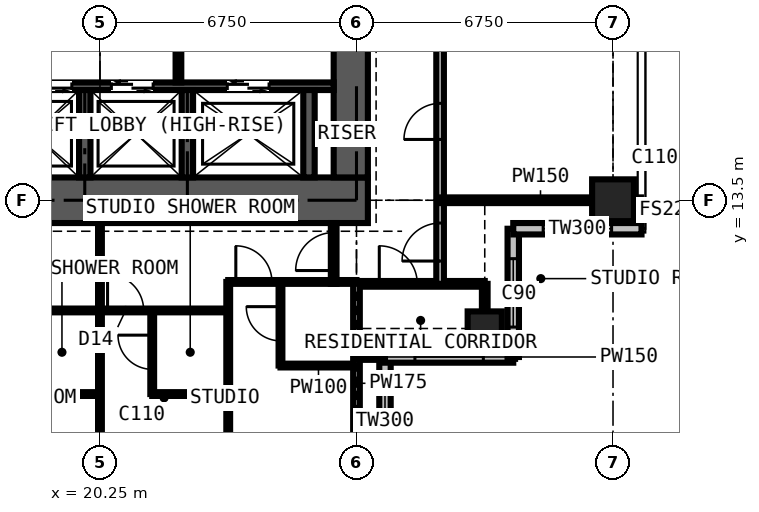
"""IFC4 building model, lengths in metres.
Left out: names, types, materials, properties, quantities, classifications, styles, units other than length and angle.
Written with IfcOpenShell. Run it as: python <this file> out.ifc"""

import sys

from ifc_helpers import new_model, si_unit, direction, frame, frame_2d, origin, origin_2d, place, context, subcontext, project, spatial, rectangle, extrude, element, fill, save


model = new_model("IFC4")
c1 = context("Model", 3, precision=1e-05, world=origin(), true_north=direction((0.0, 1.0)))
c2 = subcontext(c1, "Body", "Model", "MODEL_VIEW")
j1 = project(units=[si_unit("LENGTHUNIT", "METRE"), si_unit("PLANEANGLEUNIT", "RADIAN")], contexts=[c1])
p1 = place(None, origin())
s1 = spatial("IfcSite", under=j1, at=p1, CompositionType="ELEMENT")
p2 = place(p1, origin())
s2 = spatial("IfcBuilding", under=s1, at=p2, CompositionType="ELEMENT")
p3 = place(p2, frame((0.0, 0.0, 215.1)))
s3 = spatial("IfcBuildingStorey", under=s2, at=p3, CompositionType="ELEMENT", Elevation=215.1)
p4 = place(p3, frame((30.375, 10.125, 0.0), z_axis=(0.0, 0.0, 1.0), x_axis=(1.0, 0.0, 0.0)))
e1 = element("IfcColumn", 1, at=p4, inside=s3, PredefinedType="COLUMN", context=c2, shape_type="SweptSolid", body=[
    extrude(rectangle(XDim=0.9, YDim=0.9, at=origin_2d()), origin(), (0.0, 0.0, 1.0), 3.6),
])
p5 = place(p3, frame((33.75, 13.5, 0.0), z_axis=(0.0, 0.0, 1.0), x_axis=(1.0, 0.0, 0.0)))
e2 = element("IfcColumn", 2, at=p5, inside=s3, PredefinedType="COLUMN", context=c2, shape_type="SweptSolid", body=[
    extrude(rectangle(XDim=1.1, YDim=1.1, at=origin_2d()), origin(), (0.0, 0.0, 1.0), 3.6),
])
p6 = place(p3, frame((13.2, 13.5, 0.0), z_axis=(0.0, 0.0, 1.0), x_axis=(1.0, 0.0, 0.0)))
e3 = element("IfcWall", 3, at=p6, inside=s3, PredefinedType="SHEAR", context=c2, shape_type="SweptSolid", body=[
    extrude(rectangle(XDim=14.1, YDim=1.2, at=frame_2d((7.05, 0.0))), origin(), (0.0, 0.0, 1.0), 3.6),
])
p7 = place(p3, frame((26.85, 14.1, 0.0), z_axis=(0.0, 0.0, 1.0), x_axis=(0.0, 1.0, 0.0)))
e4 = element("IfcWall", 4, at=p7, inside=s3, PredefinedType="SHEAR", context=c2, shape_type="SweptSolid", body=[
    extrude(rectangle(XDim=12.3, YDim=0.9, at=frame_2d((6.15, 0.0))), origin(), (0.0, 0.0, 1.0), 3.6),
])
p8 = place(p7, frame((3.65, 0.0, 0.0)))
e5 = element("IfcOpeningElement", 5, at=p8, cuts=e4, PredefinedType="OPENING", context=c2, shape_type="SweptSolid", body=[
    extrude(rectangle(XDim=1.2, YDim=2.2, at=frame_2d((0.6, 1.1))), frame((0.0, 0.46, 0.0), z_axis=(0.0, -1.0, 0.0), x_axis=(1.0, 0.0, 0.0)), (0.0, 0.0, 1.0), 0.92),
])
p9 = place(p3, frame((27.75, 6.0, 0.0), z_axis=(0.0, 0.0, 1.0), x_axis=(0.0, 1.0, 0.0)))
e6 = element("IfcWall", 6, at=p9, inside=s3, PredefinedType="SOLIDWALL", context=c2, shape_type="SweptSolid", body=[
    extrude(rectangle(XDim=3.375, YDim=0.3, at=frame_2d((1.688, 0.0))), origin(), (0.0, 0.0, 1.0), 3.375),
])
p10 = place(p9, frame((0.788, 0.0, 0.6)))
e7 = element("IfcOpeningElement", 7, at=p10, cuts=e6, PredefinedType="OPENING", context=c2, shape_type="SweptSolid", body=[
    extrude(rectangle(XDim=1.8, YDim=2.1, at=frame_2d((0.9, 1.05))), frame((0.0, 0.16, 0.0), z_axis=(0.0, -1.0, 0.0), x_axis=(1.0, 0.0, 0.0)), (0.0, 0.0, 1.0), 0.32),
])
p11 = place(p3, frame((27.75, 9.375, 0.0), z_axis=(0.0, 0.0, 1.0), x_axis=(1.0, 0.0, 0.0)))
e8 = element("IfcWall", 8, at=p11, inside=s3, PredefinedType="SOLIDWALL", context=c2, shape_type="SweptSolid", body=[
    extrude(rectangle(XDim=3.375, YDim=0.3, at=frame_2d((1.688, 0.0))), origin(), (0.0, 0.0, 1.0), 3.375),
])
p12 = place(p11, frame((0.788, 0.0, 0.6)))
e9 = element("IfcOpeningElement", 9, at=p12, cuts=e8, PredefinedType="OPENING", context=c2, shape_type="SweptSolid", body=[
    extrude(rectangle(XDim=1.8, YDim=2.1, at=frame_2d((0.9, 1.05))), frame((0.0, 0.16, 0.0), z_axis=(0.0, -1.0, 0.0), x_axis=(1.0, 0.0, 0.0)), (0.0, 0.0, 1.0), 0.32),
])
p13 = place(p3, frame((31.125, 9.375, 0.0), z_axis=(0.0, 0.0, 1.0), x_axis=(0.0, 1.0, 0.0)))
e10 = element("IfcWall", 10, at=p13, inside=s3, PredefinedType="SOLIDWALL", context=c2, shape_type="SweptSolid", body=[
    extrude(rectangle(XDim=3.375, YDim=0.3, at=frame_2d((1.688, 0.0))), origin(), (0.0, 0.0, 1.0), 3.375),
])
p14 = place(p13, frame((0.788, 0.0, 0.6)))
e11 = element("IfcOpeningElement", 11, at=p14, cuts=e10, PredefinedType="OPENING", context=c2, shape_type="SweptSolid", body=[
    extrude(rectangle(XDim=1.8, YDim=2.1, at=frame_2d((0.9, 1.05))), frame((0.0, 0.16, 0.0), z_axis=(0.0, -1.0, 0.0), x_axis=(1.0, 0.0, 0.0)), (0.0, 0.0, 1.0), 0.32),
])
p15 = place(p3, frame((31.125, 12.75, 0.0), z_axis=(0.0, 0.0, 1.0), x_axis=(1.0, 0.0, 0.0)))
e12 = element("IfcWall", 12, at=p15, inside=s3, PredefinedType="SOLIDWALL", context=c2, shape_type="SweptSolid", body=[
    extrude(rectangle(XDim=3.375, YDim=0.3, at=frame_2d((1.688, 0.0))), origin(), (0.0, 0.0, 1.0), 3.375),
])
p16 = place(p15, frame((0.788, 0.0, 0.6)))
e13 = element("IfcOpeningElement", 13, at=p16, cuts=e12, PredefinedType="OPENING", context=c2, shape_type="SweptSolid", body=[
    extrude(rectangle(XDim=1.8, YDim=2.1, at=frame_2d((0.9, 1.05))), frame((0.0, 0.16, 0.0), z_axis=(0.0, -1.0, 0.0), x_axis=(1.0, 0.0, 0.0)), (0.0, 0.0, 1.0), 0.32),
])
p17 = place(p3, frame((14.1, 16.5, 0.0), z_axis=(0.0, 0.0, 1.0), x_axis=(1.0, 0.0, 0.0)))
e14 = element("IfcWall", 14, at=p17, inside=s3, PredefinedType="SHEAR", context=c2, shape_type="SweptSolid", body=[
    extrude(rectangle(XDim=12.3, YDim=0.2, at=frame_2d((6.15, 0.0))), origin(), (0.0, 0.0, 1.0), 3.6),
])
p18 = place(p17, frame((0.9, 0.0, 0.0)))
e15 = element("IfcOpeningElement", 15, at=p18, cuts=e14, PredefinedType="OPENING", context=c2, shape_type="SweptSolid", body=[
    extrude(rectangle(XDim=1.1, YDim=2.2, at=frame_2d((0.55, 1.1))), frame((0.0, 0.11, 0.0), z_axis=(0.0, -1.0, 0.0), x_axis=(1.0, 0.0, 0.0)), (0.0, 0.0, 1.0), 0.22),
])
p19 = place(p17, frame((4.31, 0.0, 0.0)))
e16 = element("IfcOpeningElement", 16, at=p19, cuts=e14, PredefinedType="OPENING", context=c2, shape_type="SweptSolid", body=[
    extrude(rectangle(XDim=1.1, YDim=2.2, at=frame_2d((0.55, 1.1))), frame((0.0, 0.11, 0.0), z_axis=(0.0, -1.0, 0.0), x_axis=(1.0, 0.0, 0.0)), (0.0, 0.0, 1.0), 0.22),
])
p20 = place(p17, frame((6.45, 0.0, 0.0)))
e17 = element("IfcOpeningElement", 17, at=p20, cuts=e14, PredefinedType="OPENING", context=c2, shape_type="SweptSolid", body=[
    extrude(rectangle(XDim=1.1, YDim=2.2, at=frame_2d((0.55, 1.1))), frame((0.0, 0.11, 0.0), z_axis=(0.0, -1.0, 0.0), x_axis=(1.0, 0.0, 0.0)), (0.0, 0.0, 1.0), 0.22),
])
p21 = place(p17, frame((9.5, 0.0, 0.0)))
e18 = element("IfcOpeningElement", 18, at=p21, cuts=e14, PredefinedType="OPENING", context=c2, shape_type="SweptSolid", body=[
    extrude(rectangle(XDim=1.1, YDim=2.2, at=frame_2d((0.55, 1.1))), frame((0.0, 0.11, 0.0), z_axis=(0.0, -1.0, 0.0), x_axis=(1.0, 0.0, 0.0)), (0.0, 0.0, 1.0), 0.22),
])
for number, where, z_axis, x_axis in (
    (19, (19.85, 14.1, 0.0), (0.0, 0.0, 1.0), (0.0, 1.0, 0.0)),
    (20, (22.55, 14.1, 0.0), (0.0, 0.0, 1.0), (0.0, 1.0, 0.0)),
    (21, (25.75, 14.1, 0.0), (0.0, 0.0, 1.0), (0.0, 1.0, 0.0)),
):
    element("IfcWall", number, at=place(p3, frame(where, z_axis=z_axis, x_axis=x_axis)), inside=s3, PredefinedType="SHEAR", context=c2, shape_type="SweptSolid", body=[
        extrude(rectangle(XDim=2.3, YDim=0.3, at=frame_2d((1.15, 0.0))), origin(), (0.0, 0.0, 1.0), 3.6),
    ])
p22 = place(p3, frame((22.315, 16.6, 0.0), z_axis=(0.0, 0.0, 1.0), x_axis=(0.0, 1.0, 0.0)))
e22 = element("IfcWall", 22, at=p22, inside=s3, PredefinedType="PARTITIONING", context=c2, shape_type="SweptSolid", body=[
    extrude(rectangle(XDim=3.5, YDim=0.15, at=frame_2d((1.75, 0.0))), origin(), (0.0, 0.0, 1.0), 3.375),
])
p23 = place(p22, frame((1.15, 0.0, 0.0)))
e23 = element("IfcOpeningElement", 23, at=p23, cuts=e22, PredefinedType="OPENING", context=c2, shape_type="SweptSolid", body=[
    extrude(rectangle(XDim=1.2, YDim=2.2, at=frame_2d((0.6, 1.1))), frame((0.0, 0.085, 0.0), z_axis=(0.0, -1.0, 0.0), x_axis=(1.0, 0.0, 0.0)), (0.0, 0.0, 1.0), 0.17),
])
p24 = place(p3, frame((13.5, 10.6, 0.0), z_axis=(0.0, 0.0, 1.0), x_axis=(1.0, 0.0, 0.0)))
e24 = element("IfcWall", 24, at=p24, inside=s3, PredefinedType="PARTITIONING", context=c2, shape_type="SweptSolid", body=[
    extrude(rectangle(XDim=10.125, YDim=0.1, at=frame_2d((5.062, 0.0))), origin(), (0.0, 0.0, 1.0), 3.375),
])
p25 = place(p24, frame((1.2, 0.0, 0.0)))
e25 = element("IfcOpeningElement", 25, at=p25, cuts=e24, PredefinedType="OPENING", context=c2, shape_type="SweptSolid", body=[
    extrude(rectangle(XDim=1.0, YDim=2.2, at=frame_2d((0.5, 1.1))), frame((0.0, 0.06, 0.0), z_axis=(0.0, -1.0, 0.0), x_axis=(1.0, 0.0, 0.0)), (0.0, 0.0, 1.0), 0.12),
])
p26 = place(p24, frame((3.575, 0.0, 0.0)))
e26 = element("IfcOpeningElement", 26, at=p26, cuts=e24, PredefinedType="OPENING", context=c2, shape_type="SweptSolid", body=[
    extrude(rectangle(XDim=0.95, YDim=2.2, at=frame_2d((0.475, 1.1))), frame((0.0, 0.06, 0.0), z_axis=(0.0, -1.0, 0.0), x_axis=(1.0, 0.0, 0.0)), (0.0, 0.0, 1.0), 0.12),
])
p27 = place(p24, frame((6.95, 0.0, 0.0)))
e27 = element("IfcOpeningElement", 27, at=p27, cuts=e24, PredefinedType="OPENING", context=c2, shape_type="SweptSolid", body=[
    extrude(rectangle(XDim=0.95, YDim=2.2, at=frame_2d((0.475, 1.1))), frame((0.0, 0.06, 0.0), z_axis=(0.0, -1.0, 0.0), x_axis=(1.0, 0.0, 0.0)), (0.0, 0.0, 1.0), 0.12),
])
p28 = place(p3, frame((18.25, 8.4, 0.0), z_axis=(0.0, 0.0, 1.0), x_axis=(1.0, 0.0, 0.0)))
e28 = element("IfcWall", 28, at=p28, inside=s3, PredefinedType="PARTITIONING", context=c2, shape_type="SweptSolid", body=[
    extrude(rectangle(XDim=2.0, YDim=0.1, at=frame_2d((1.0, 0.0))), origin(), (0.0, 0.0, 1.0), 3.375),
])
p29 = place(p3, frame((20.25, 6.016, 0.0), z_axis=(0.0, 0.0, 1.0), x_axis=(0.0, 1.0, 0.0)))
e29 = element("IfcWall", 29, at=p29, inside=s3, PredefinedType="PARTITIONING", context=c2, shape_type="SweptSolid", body=[
    extrude(rectangle(XDim=6.884, YDim=0.1, at=frame_2d((3.442, 0.0))), origin(), (0.0, 0.0, 1.0), 2.61),
])
p30 = place(p3, frame((21.625, 8.4, 0.0), z_axis=(0.0, 0.0, 1.0), x_axis=(0.0, 1.0, 0.0)))
e30 = element("IfcWall", 30, at=p30, inside=s3, PredefinedType="PARTITIONING", context=c2, shape_type="SweptSolid", body=[
    extrude(rectangle(XDim=2.2, YDim=0.1, at=frame_2d((1.1, 0.0))), origin(), (0.0, 0.0, 1.0), 3.375),
])
p31 = place(p30, frame((0.65, 0.0, 0.0)))
e31 = element("IfcOpeningElement", 31, at=p31, cuts=e30, PredefinedType="OPENING", context=c2, shape_type="SweptSolid", body=[
    extrude(rectangle(XDim=0.9, YDim=2.2, at=frame_2d((0.45, 1.1))), frame((0.0, 0.06, 0.0), z_axis=(0.0, -1.0, 0.0), x_axis=(1.0, 0.0, 0.0)), (0.0, 0.0, 1.0), 0.12),
])
p32 = place(p3, frame((21.625, 8.4, 0.0), z_axis=(0.0, 0.0, 1.0), x_axis=(1.0, 0.0, 0.0)))
e32 = element("IfcWall", 32, at=p32, inside=s3, PredefinedType="PARTITIONING", context=c2, shape_type="SweptSolid", body=[
    extrude(rectangle(XDim=2.0, YDim=0.1, at=frame_2d((1.0, 0.0))), origin(), (0.0, 0.0, 1.0), 3.375),
])
p33 = place(p3, frame((23.625, 6.016, 0.0), z_axis=(0.0, 0.0, 1.0), x_axis=(0.0, 1.0, 0.0)))
e33 = element("IfcWall", 33, at=p33, inside=s3, PredefinedType="PARTITIONING", context=c2, shape_type="SweptSolid", body=[
    extrude(rectangle(XDim=5.334, YDim=0.1, at=frame_2d((2.667, 0.0))), origin(), (0.0, 0.0, 1.0), 3.375),
])
p34 = place(p3, frame((23.625, 11.35, 0.0), z_axis=(0.0, 0.0, 1.0), x_axis=(1.0, 0.0, 0.0)))
e34 = element("IfcWall", 34, at=p34, inside=s3, PredefinedType="PARTITIONING", context=c2, shape_type="SweptSolid", body=[
    extrude(rectangle(XDim=3.375, YDim=0.1, at=frame_2d((1.688, 0.0))), origin(), (0.0, 0.0, 1.0), 3.375),
])
p35 = place(p34, frame((0.2, 0.0, 0.0)))
e35 = element("IfcOpeningElement", 35, at=p35, cuts=e34, PredefinedType="OPENING", context=c2, shape_type="SweptSolid", body=[
    extrude(rectangle(XDim=0.95, YDim=2.2, at=frame_2d((0.475, 1.1))), frame((0.0, 0.06, 0.0), z_axis=(0.0, -1.0, 0.0), x_axis=(1.0, 0.0, 0.0)), (0.0, 0.0, 1.0), 0.12),
])
p36 = place(p3, frame((25.0, 9.15, 0.0), z_axis=(0.0, 0.0, 1.0), x_axis=(0.0, 1.0, 0.0)))
e36 = element("IfcWall", 36, at=p36, inside=s3, PredefinedType="PARTITIONING", context=c2, shape_type="SweptSolid", body=[
    extrude(rectangle(XDim=2.2, YDim=0.1, at=frame_2d((1.1, 0.0))), origin(), (0.0, 0.0, 1.0), 3.375),
])
p37 = place(p36, frame((0.65, 0.0, 0.0)))
e37 = element("IfcOpeningElement", 37, at=p37, cuts=e36, PredefinedType="OPENING", context=c2, shape_type="SweptSolid", body=[
    extrude(rectangle(XDim=0.9, YDim=2.2, at=frame_2d((0.45, 1.1))), frame((0.0, 0.06, 0.0), z_axis=(0.0, -1.0, 0.0), x_axis=(1.0, 0.0, 0.0)), (0.0, 0.0, 1.0), 0.12),
])
p38 = place(p3, frame((25.0, 9.15, 0.0), z_axis=(0.0, 0.0, 1.0), x_axis=(1.0, 0.0, 0.0)))
e38 = element("IfcWall", 38, at=p38, inside=s3, PredefinedType="PARTITIONING", context=c2, shape_type="SweptSolid", body=[
    extrude(rectangle(XDim=2.0, YDim=0.1, at=frame_2d((1.0, 0.0))), origin(), (0.0, 0.0, 1.0), 3.375),
])
p39 = place(p3, frame((26.4, 11.3, 0.0), z_axis=(0.0, 0.0, 1.0), x_axis=(0.0, 1.0, 0.0)))
e39 = element("IfcWall", 39, at=p39, inside=s3, PredefinedType="PARTITIONING", context=c2, shape_type="SweptSolid", body=[
    extrude(rectangle(XDim=1.6, YDim=0.15, at=frame_2d((0.8, 0.0))), origin(), (0.0, 0.0, 1.0), 3.375),
])
p40 = place(p39, frame((0.35, 0.0, 0.0)))
e40 = element("IfcOpeningElement", 40, at=p40, cuts=e39, PredefinedType="OPENING", context=c2, shape_type="SweptSolid", body=[
    extrude(rectangle(XDim=1.0, YDim=2.2, at=frame_2d((0.5, 1.1))), frame((0.0, 0.085, 0.0), z_axis=(0.0, -1.0, 0.0), x_axis=(1.0, 0.0, 0.0)), (0.0, 0.0, 1.0), 0.17),
])
p41 = place(p3, frame((27.0, 11.3, 0.0), z_axis=(0.0, 0.0, 1.0), x_axis=(1.0, 0.0, 0.0)))
e41 = element("IfcWall", 41, at=p41, inside=s3, PredefinedType="PARTITIONING", context=c2, shape_type="SweptSolid", body=[
    extrude(rectangle(XDim=3.375, YDim=0.15, at=frame_2d((1.688, 0.0))), origin(), (0.0, 0.0, 1.0), 3.375),
])
p42 = place(p41, frame((0.6, 0.0, 0.0)))
e42 = element("IfcOpeningElement", 42, at=p42, cuts=e41, PredefinedType="OPENING", context=c2, shape_type="SweptSolid", body=[
    extrude(rectangle(XDim=1.0, YDim=2.2, at=frame_2d((0.5, 1.1))), frame((0.0, 0.085, 0.0), z_axis=(0.0, -1.0, 0.0), x_axis=(1.0, 0.0, 0.0)), (0.0, 0.0, 1.0), 0.17),
])
p43 = place(p3, frame((27.0, 6.016, 0.0), z_axis=(0.0, 0.0, 1.0), x_axis=(0.0, 1.0, 0.0)))
e43 = element("IfcWall", 43, at=p43, inside=s3, PredefinedType="PARTITIONING", context=c2, shape_type="SweptSolid", body=[
    extrude(rectangle(XDim=5.334, YDim=0.175, at=frame_2d((2.667, 0.0))), origin(), (0.0, 0.0, 1.0), 2.877),
])
p44 = place(p3, frame((27.0, 9.375, 0.0), z_axis=(0.0, 0.0, 1.0), x_axis=(1.0, 0.0, 0.0)))
e44 = element("IfcWall", 44, at=p44, inside=s3, PredefinedType="PARTITIONING", context=c2, shape_type="SweptSolid", body=[
    extrude(rectangle(XDim=0.734, YDim=0.15, at=frame_2d((0.367, 0.0))), origin(), (0.0, 0.0, 1.0), 3.375),
])
p45 = place(p3, frame((29.2, 11.3, 0.0), z_axis=(0.0, 0.0, 1.0), x_axis=(0.0, 1.0, 0.0)))
e45 = element("IfcWall", 45, at=p45, inside=s3, PredefinedType="PARTITIONING", context=c2, shape_type="SweptSolid", body=[
    extrude(rectangle(XDim=17.9, YDim=0.2, at=frame_2d((8.95, 0.0))), origin(), (0.0, 0.0, 1.0), 3.375),
])
p46 = place(p45, frame((0.6, 0.0, 0.0)))
e46 = element("IfcOpeningElement", 46, at=p46, cuts=e45, PredefinedType="OPENING", context=c2, shape_type="SweptSolid", body=[
    extrude(rectangle(XDim=1.0, YDim=2.2, at=frame_2d((0.5, 1.1))), frame((0.0, 0.11, 0.0), z_axis=(0.0, -1.0, 0.0), x_axis=(1.0, 0.0, 0.0)), (0.0, 0.0, 1.0), 0.22),
])
p47 = place(p45, frame((10.55, 0.0, 0.0)))
e47 = element("IfcOpeningElement", 47, at=p47, cuts=e45, PredefinedType="OPENING", context=c2, shape_type="SweptSolid", body=[
    extrude(rectangle(XDim=0.95, YDim=2.2, at=frame_2d((0.475, 1.1))), frame((0.0, 0.11, 0.0), z_axis=(0.0, -1.0, 0.0), x_axis=(1.0, 0.0, 0.0)), (0.0, 0.0, 1.0), 0.22),
])
p48 = place(p45, frame((3.8, 0.0, 0.0)))
e48 = element("IfcOpeningElement", 48, at=p48, cuts=e45, PredefinedType="OPENING", context=c2, shape_type="SweptSolid", body=[
    extrude(rectangle(XDim=0.95, YDim=2.2, at=frame_2d((0.475, 1.1))), frame((0.0, 0.11, 0.0), z_axis=(0.0, -1.0, 0.0), x_axis=(1.0, 0.0, 0.0)), (0.0, 0.0, 1.0), 0.22),
])
p49 = place(p45, frame((16.3, 0.0, 0.0)))
e49 = element("IfcOpeningElement", 49, at=p49, cuts=e45, PredefinedType="OPENING", context=c2, shape_type="SweptSolid", body=[
    extrude(rectangle(XDim=1.0, YDim=2.2, at=frame_2d((0.5, 1.1))), frame((0.0, 0.11, 0.0), z_axis=(0.0, -1.0, 0.0), x_axis=(1.0, 0.0, 0.0)), (0.0, 0.0, 1.0), 0.22),
])
p50 = place(p3, frame((29.2, 13.5, 0.0), z_axis=(0.0, 0.0, 1.0), x_axis=(1.0, 0.0, 0.0)))
e50 = element("IfcWall", 50, at=p50, inside=s3, PredefinedType="PARTITIONING", context=c2, shape_type="SweptSolid", body=[
    extrude(rectangle(XDim=5.284, YDim=0.15, at=frame_2d((2.642, 0.0))), origin(), (0.0, 0.0, 1.0), 2.877),
])
p51 = place(p3, frame((30.375, 9.525, 0.0), z_axis=(0.0, 0.0, 1.0), x_axis=(0.0, 1.0, 0.0)))
e51 = element("IfcWall", 51, at=p51, inside=s3, PredefinedType="PARTITIONING", context=c2, shape_type="SweptSolid", body=[
    extrude(rectangle(XDim=1.775, YDim=0.15, at=frame_2d((0.888, 0.0))), origin(), (0.0, 0.0, 1.0), 2.877),
])
p52 = place(p10, origin())
e52 = element("IfcWindow", 52, at=p52, inside=s3, PartitioningType="SINGLE_PANEL", PredefinedType="WINDOW", context=c2, shape_type="SweptSolid", body=[
    extrude(rectangle(XDim=1.8, YDim=2.1, at=frame_2d((0.9, 1.05))), frame((0.0, 0.03, 0.0), z_axis=(0.0, -1.0, 0.0), x_axis=(1.0, 0.0, 0.0)), (0.0, 0.0, 1.0), 0.06),
])
fill(e7, e52)
p53 = place(p12, origin())
e53 = element("IfcWindow", 53, at=p53, inside=s3, PartitioningType="SINGLE_PANEL", PredefinedType="WINDOW", context=c2, shape_type="SweptSolid", body=[
    extrude(rectangle(XDim=1.8, YDim=2.1, at=frame_2d((0.9, 1.05))), frame((0.0, 0.03, 0.0), z_axis=(0.0, -1.0, 0.0), x_axis=(1.0, 0.0, 0.0)), (0.0, 0.0, 1.0), 0.06),
])
fill(e9, e53)
p54 = place(p14, origin())
e54 = element("IfcWindow", 54, at=p54, inside=s3, PartitioningType="SINGLE_PANEL", PredefinedType="WINDOW", context=c2, shape_type="SweptSolid", body=[
    extrude(rectangle(XDim=1.8, YDim=2.1, at=frame_2d((0.9, 1.05))), frame((0.0, 0.03, 0.0), z_axis=(0.0, -1.0, 0.0), x_axis=(1.0, 0.0, 0.0)), (0.0, 0.0, 1.0), 0.06),
])
fill(e11, e54)
p55 = place(p16, origin())
e55 = element("IfcWindow", 55, at=p55, inside=s3, PartitioningType="SINGLE_PANEL", PredefinedType="WINDOW", context=c2, shape_type="SweptSolid", body=[
    extrude(rectangle(XDim=1.8, YDim=2.1, at=frame_2d((0.9, 1.05))), frame((0.0, 0.03, 0.0), z_axis=(0.0, -1.0, 0.0), x_axis=(1.0, 0.0, 0.0)), (0.0, 0.0, 1.0), 0.06),
])
fill(e13, e55)
p56 = place(p19, origin())
e56 = element("IfcDoor", 56, at=p56, inside=s3, OperationType="DOUBLE_DOOR_SLIDING", PredefinedType="DOOR", context=c2, shape_type="SweptSolid", body=[
    extrude(rectangle(XDim=1.1, YDim=2.2, at=frame_2d((0.55, 1.1))), frame((0.0, 0.025, 0.0), z_axis=(0.0, -1.0, 0.0), x_axis=(1.0, 0.0, 0.0)), (0.0, 0.0, 1.0), 0.05),
])
fill(e16, e56)
p57 = place(p20, origin())
e57 = element("IfcDoor", 57, at=p57, inside=s3, OperationType="DOUBLE_DOOR_SLIDING", PredefinedType="DOOR", context=c2, shape_type="SweptSolid", body=[
    extrude(rectangle(XDim=1.1, YDim=2.2, at=frame_2d((0.55, 1.1))), frame((0.0, 0.025, 0.0), z_axis=(0.0, -1.0, 0.0), x_axis=(1.0, 0.0, 0.0)), (0.0, 0.0, 1.0), 0.05),
])
fill(e17, e57)
p58 = place(p21, origin())
e58 = element("IfcDoor", 58, at=p58, inside=s3, OperationType="DOUBLE_DOOR_SLIDING", PredefinedType="DOOR", context=c2, shape_type="SweptSolid", body=[
    extrude(rectangle(XDim=1.1, YDim=2.2, at=frame_2d((0.55, 1.1))), frame((0.0, 0.025, 0.0), z_axis=(0.0, -1.0, 0.0), x_axis=(1.0, 0.0, 0.0)), (0.0, 0.0, 1.0), 0.05),
])
fill(e18, e58)
p59 = place(p27, origin())
e59 = element("IfcDoor", 59, at=p59, inside=s3, OperationType="SINGLE_SWING_LEFT", PredefinedType="DOOR", context=c2, shape_type="SweptSolid", body=[
    extrude(rectangle(XDim=0.95, YDim=2.2, at=frame_2d((0.475, 1.1))), frame((0.0, 0.025, 0.0), z_axis=(0.0, -1.0, 0.0), x_axis=(1.0, 0.0, 0.0)), (0.0, 0.0, 1.0), 0.05),
])
fill(e27, e59)
p60 = place(p31, origin())
e60 = element("IfcDoor", 60, at=p60, inside=s3, OperationType="SINGLE_SWING_RIGHT", PredefinedType="DOOR", context=c2, shape_type="SweptSolid", body=[
    extrude(rectangle(XDim=0.9, YDim=2.2, at=frame_2d((0.45, 1.1))), frame((0.0, 0.025, 0.0), z_axis=(0.0, -1.0, 0.0), x_axis=(1.0, 0.0, 0.0)), (0.0, 0.0, 1.0), 0.05),
])
fill(e31, e60)
p61 = place(p35, origin())
e61 = element("IfcDoor", 61, at=p61, inside=s3, OperationType="SINGLE_SWING_LEFT", PredefinedType="DOOR", context=c2, shape_type="SweptSolid", body=[
    extrude(rectangle(XDim=0.95, YDim=2.2, at=frame_2d((0.475, 1.1))), frame((0.0, 0.025, 0.0), z_axis=(0.0, -1.0, 0.0), x_axis=(1.0, 0.0, 0.0)), (0.0, 0.0, 1.0), 0.05),
])
fill(e35, e61)
p62 = place(p37, origin())
e62 = element("IfcDoor", 62, at=p62, inside=s3, OperationType="SINGLE_SWING_RIGHT", PredefinedType="DOOR", context=c2, shape_type="SweptSolid", body=[
    extrude(rectangle(XDim=0.9, YDim=2.2, at=frame_2d((0.45, 1.1))), frame((0.0, 0.025, 0.0), z_axis=(0.0, -1.0, 0.0), x_axis=(1.0, 0.0, 0.0)), (0.0, 0.0, 1.0), 0.05),
])
fill(e37, e62)
p63 = place(p42, origin())
e63 = element("IfcDoor", 63, at=p63, inside=s3, OperationType="SINGLE_SWING_LEFT", PredefinedType="DOOR", context=c2, shape_type="SweptSolid", body=[
    extrude(rectangle(XDim=1.0, YDim=2.2, at=frame_2d((0.5, 1.1))), frame((0.0, 0.025, 0.0), z_axis=(0.0, -1.0, 0.0), x_axis=(1.0, 0.0, 0.0)), (0.0, 0.0, 1.0), 0.05),
])
fill(e42, e63)
p64 = place(p40, origin())
e64 = element("IfcDoor", 64, at=p64, inside=s3, OperationType="SINGLE_SWING_LEFT", PredefinedType="DOOR", context=c2, shape_type="SweptSolid", body=[
    extrude(rectangle(XDim=1.0, YDim=2.2, at=frame_2d((0.5, 1.1))), frame((0.0, 0.025, 0.0), z_axis=(0.0, -1.0, 0.0), x_axis=(1.0, 0.0, 0.0)), (0.0, 0.0, 1.0), 0.05),
])
fill(e40, e64)
p65 = place(p46, origin())
e65 = element("IfcDoor", 65, at=p65, inside=s3, OperationType="SINGLE_SWING_LEFT", PredefinedType="DOOR", context=c2, shape_type="SweptSolid", body=[
    extrude(rectangle(XDim=1.0, YDim=2.2, at=frame_2d((0.5, 1.1))), frame((0.0, 0.025, 0.0), z_axis=(0.0, -1.0, 0.0), x_axis=(1.0, 0.0, 0.0)), (0.0, 0.0, 1.0), 0.05),
])
fill(e46, e65)
p66 = place(p48, origin())
e66 = element("IfcDoor", 66, at=p66, inside=s3, OperationType="SINGLE_SWING_LEFT", PredefinedType="DOOR", context=c2, shape_type="SweptSolid", body=[
    extrude(rectangle(XDim=0.95, YDim=2.2, at=frame_2d((0.475, 1.1))), frame((0.0, 0.025, 0.0), z_axis=(0.0, -1.0, 0.0), x_axis=(1.0, 0.0, 0.0)), (0.0, 0.0, 1.0), 0.05),
])
fill(e48, e66)
save(model, sys.argv[1])
